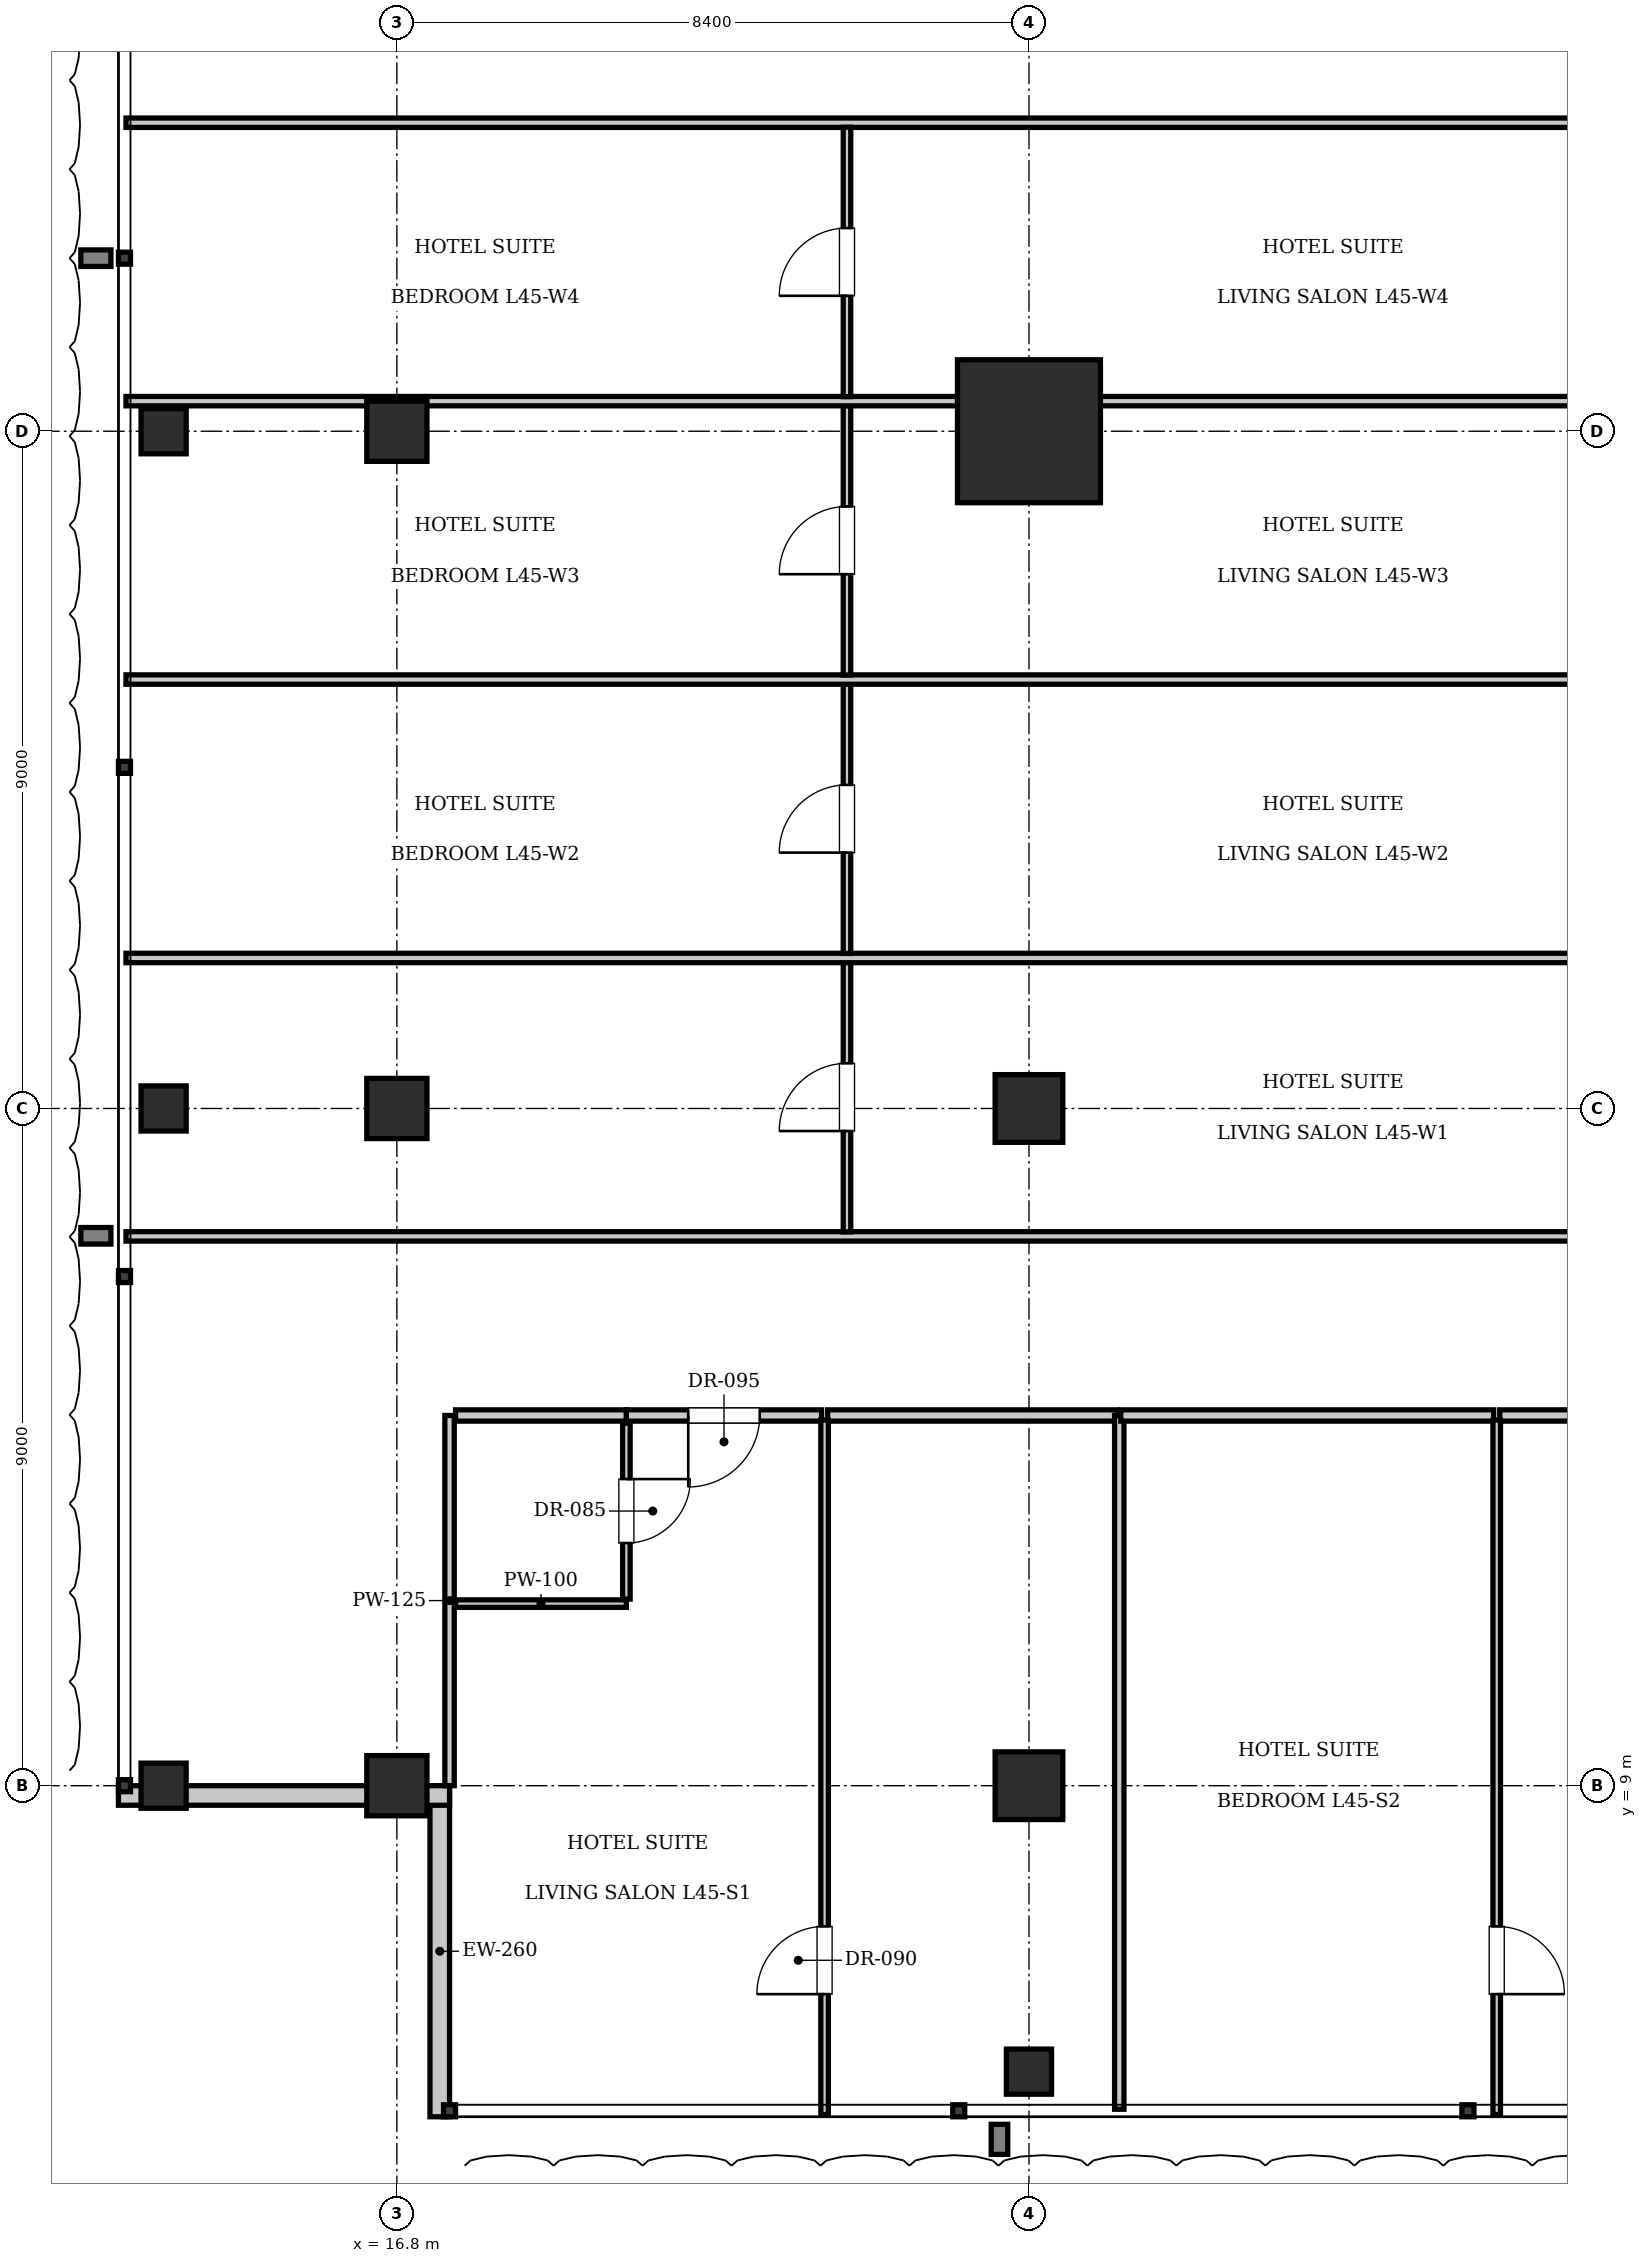
"""IFC4 building model, lengths in metres.
Left out: names, types, materials, properties, quantities, classifications, styles, units other than length and angle.
Written with IfcOpenShell. Run it as: python <this file> out.ifc"""

import sys

from ifc_helpers import new_model, si_unit, direction, frame, frame_2d, origin, origin_2d, place, context, subcontext, project, spatial, rectangle, i_section, extrude, element, fill, save


model = new_model("IFC4")
c1 = context("Model", 3, precision=1e-05, world=origin(), true_north=direction((0.0, 1.0)))
c2 = subcontext(c1, "Body", "Model", "MODEL_VIEW")
j1 = project(units=[si_unit("LENGTHUNIT", "METRE"), si_unit("PLANEANGLEUNIT", "RADIAN")], contexts=[c1])
p1 = place(None, origin())
s1 = spatial("IfcSite", under=j1, at=p1, CompositionType="ELEMENT")
p2 = place(p1, origin())
s2 = spatial("IfcBuilding", under=s1, at=p2, CompositionType="ELEMENT")
p3 = place(p2, frame((0.0, 0.0, 185.15)))
s3 = spatial("IfcBuildingStorey", under=s2, at=p3, CompositionType="ELEMENT", Elevation=185.15)
p4 = place(p3, frame((25.2, 27.0, 0.0), z_axis=(0.0, 0.0, 1.0), x_axis=(1.0, 0.0, 0.0)))
e1 = element("IfcColumn", 1, at=p4, inside=s3, PredefinedType="COLUMN", context=c2, shape_type="SweptSolid", body=[
    extrude(rectangle(XDim=1.9, YDim=1.9, at=origin_2d()), origin(), (0.0, 0.0, 1.0), 3.85),
])
for number, where, z_axis, x_axis in (
    (2, (25.2, 18.0, 0.0), (0.0, 0.0, 1.0), (1.0, 0.0, 0.0)),
    (3, (25.2, 9.0, 0.0), (0.0, 0.0, 1.0), (1.0, 0.0, 0.0)),
):
    element("IfcColumn", number, at=place(p3, frame(where, z_axis=z_axis, x_axis=x_axis)), inside=s3, PredefinedType="COLUMN", context=c2, shape_type="SweptSolid", body=[
        extrude(rectangle(XDim=0.9, YDim=0.9, at=origin_2d()), origin(), (0.0, 0.0, 1.0), 3.85),
    ])
for number, where, z_axis, x_axis in (
    (4, (16.8, 9.0, 0.0), (0.0, 0.0, 1.0), (1.0, 0.0, 0.0)),
    (5, (16.8, 18.0, 0.0), (0.0, 0.0, 1.0), (1.0, 0.0, 0.0)),
    (6, (16.8, 27.0, 0.0), (0.0, 0.0, 1.0), (1.0, 0.0, 0.0)),
):
    element("IfcColumn", number, at=place(p3, frame(where, z_axis=z_axis, x_axis=x_axis)), inside=s3, PredefinedType="COLUMN", context=c2, shape_type="SweptSolid", body=[
        extrude(rectangle(XDim=0.8, YDim=0.8, at=origin_2d()), origin(), (0.0, 0.0, 1.0), 3.85),
    ])
for number, where, z_axis, x_axis in (
    (7, (13.7, 9.0, 0.0), (0.0, 0.0, 1.0), (1.0, 0.0, 0.0)),
    (8, (13.7, 18.0, 0.0), (0.0, 0.0, 1.0), (1.0, 0.0, 0.0)),
    (9, (13.7, 27.0, 0.0), (0.0, 0.0, 1.0), (1.0, 0.0, 0.0)),
    (10, (25.2, 5.2, 0.0), (0.0, 0.0, 1.0), (1.0, 0.0, 0.0)),
):
    element("IfcColumn", number, at=place(p3, frame(where, z_axis=z_axis, x_axis=x_axis)), inside=s3, PredefinedType="COLUMN", context=c2, shape_type="SweptSolid", body=[
        extrude(i_section(OverallWidth=0.6, OverallDepth=0.6, WebThickness=0.025, FlangeThickness=0.038, at=origin_2d()), origin(), (0.0, 0.0, 1.0), 3.85),
    ])
p5 = place(p3, frame((17.37, 4.6, 0.0), z_axis=(0.0, 0.0, 1.0), x_axis=(0.0, 1.0, 0.0)))
e11 = element("IfcWall", 11, at=p5, inside=s3, PredefinedType="SOLIDWALL", context=c2, shape_type="SweptSolid", body=[
    extrude(rectangle(XDim=4.4, YDim=0.26, at=frame_2d((2.2, 0.0))), origin(), (0.0, 0.0, 1.0), 3.61),
])
p6 = place(p3, frame((17.5, 8.87, 0.0), z_axis=(0.0, 0.0, 1.0), x_axis=(-1.0, 0.0, 0.0)))
e12 = element("IfcWall", 12, at=p6, inside=s3, PredefinedType="SOLIDWALL", context=c2, shape_type="SweptSolid", body=[
    extrude(rectangle(XDim=4.4, YDim=0.26, at=frame_2d((2.2, 0.0))), origin(), (0.0, 0.0, 1.0), 3.007),
])
p7 = place(p3, frame((17.5, 9.0, 0.0), z_axis=(0.0, 0.0, 1.0), x_axis=(0.0, 1.0, 0.0)))
e13 = element("IfcWall", 13, at=p7, inside=s3, PredefinedType="PARTITIONING", context=c2, shape_type="SweptSolid", body=[
    extrude(rectangle(XDim=4.92, YDim=0.125, at=frame_2d((2.46, 0.0))), origin(), (0.0, 0.0, 1.0), 3.61),
])
p8 = place(p3, frame((17.58, 13.92, 0.0), z_axis=(0.0, 0.0, 1.0), x_axis=(1.0, 0.0, 0.0)))
e14 = element("IfcWall", 14, at=p8, inside=s3, PredefinedType="PARTITIONING", context=c2, shape_type="SweptSolid", body=[
    extrude(rectangle(XDim=2.27, YDim=0.15, at=frame_2d((1.135, 0.0))), origin(), (0.0, 0.0, 1.0), 3.61),
])
p9 = place(p3, frame((17.58, 11.42, 0.0), z_axis=(0.0, 0.0, 1.0), x_axis=(1.0, 0.0, 0.0)))
e15 = element("IfcWall", 15, at=p9, inside=s3, PredefinedType="PARTITIONING", context=c2, shape_type="SweptSolid", body=[
    extrude(rectangle(XDim=2.27, YDim=0.1, at=frame_2d((1.135, 0.0))), origin(), (0.0, 0.0, 1.0), 3.61),
])
p10 = place(p3, frame((19.85, 11.48, 0.0), z_axis=(0.0, 0.0, 1.0), x_axis=(0.0, 1.0, 0.0)))
e16 = element("IfcWall", 16, at=p10, inside=s3, PredefinedType="PARTITIONING", context=c2, shape_type="SweptSolid", body=[
    extrude(rectangle(XDim=2.34, YDim=0.1, at=frame_2d((1.17, 0.0))), origin(), (0.0, 0.0, 1.0), 3.61),
])
p11 = place(p10, frame((0.745, 0.0, 0.0)))
e17 = element("IfcOpeningElement", 17, at=p11, cuts=e16, PredefinedType="OPENING", context=c2, shape_type="SweptSolid", body=[
    extrude(rectangle(XDim=0.85, YDim=2.1, at=frame_2d((0.425, 1.05))), frame((0.0, 0.06, 0.0), z_axis=(0.0, -1.0, 0.0), x_axis=(1.0, 0.0, 0.0)), (0.0, 0.0, 1.0), 0.12),
])
p12 = place(p3, frame((19.85, 13.92, 0.0), z_axis=(0.0, 0.0, 1.0), x_axis=(1.0, 0.0, 0.0)))
e18 = element("IfcWall", 18, at=p12, inside=s3, PredefinedType="PARTITIONING", context=c2, shape_type="SweptSolid", body=[
    extrude(rectangle(XDim=2.594, YDim=0.15, at=frame_2d((1.297, 0.0))), origin(), (0.0, 0.0, 1.0), 3.61),
])
p13 = place(p12, frame((0.822, 0.0, 0.0)))
e19 = element("IfcOpeningElement", 19, at=p13, cuts=e18, PredefinedType="OPENING", context=c2, shape_type="SweptSolid", body=[
    extrude(rectangle(XDim=0.95, YDim=2.15, at=frame_2d((0.475, 1.075))), frame((0.0, 0.085, 0.0), z_axis=(0.0, -1.0, 0.0), x_axis=(1.0, 0.0, 0.0)), (0.0, 0.0, 1.0), 0.17),
])
p14 = place(p3, frame((22.524, 13.92, 0.0), z_axis=(0.0, 0.0, 1.0), x_axis=(1.0, 0.0, 0.0)))
e20 = element("IfcWall", 20, at=p14, inside=s3, PredefinedType="PARTITIONING", context=c2, shape_type="SweptSolid", body=[
    extrude(rectangle(XDim=3.856, YDim=0.15, at=frame_2d((1.928, 0.0))), origin(), (0.0, 0.0, 1.0), 3.61),
])
p15 = place(p3, frame((22.484, 4.63, 0.0), z_axis=(0.0, 0.0, 1.0), x_axis=(0.0, 1.0, 0.0)))
e21 = element("IfcWall", 21, at=p15, inside=s3, PredefinedType="PARTITIONING", context=c2, shape_type="SweptSolid", body=[
    extrude(rectangle(XDim=9.23, YDim=0.1, at=frame_2d((4.615, 0.0))), origin(), (0.0, 0.0, 1.0), 3.61),
])
p16 = place(p15, frame((1.6, 0.0, 0.0)))
e22 = element("IfcOpeningElement", 22, at=p16, cuts=e21, PredefinedType="OPENING", context=c2, shape_type="SweptSolid", body=[
    extrude(rectangle(XDim=0.9, YDim=2.1, at=frame_2d((0.45, 1.05))), frame((0.0, 0.06, 0.0), z_axis=(0.0, -1.0, 0.0), x_axis=(1.0, 0.0, 0.0)), (0.0, 0.0, 1.0), 0.12),
])
p17 = place(p3, frame((26.4, 4.7, 0.0), z_axis=(0.0, 0.0, 1.0), x_axis=(0.0, 1.0, 0.0)))
e23 = element("IfcWall", 23, at=p17, inside=s3, PredefinedType="PARTITIONING", context=c2, shape_type="SweptSolid", body=[
    extrude(rectangle(XDim=9.22, YDim=0.125, at=frame_2d((4.61, 0.0))), origin(), (0.0, 0.0, 1.0), 3.61),
])
p18 = place(p3, frame((26.42, 13.92, 0.0), z_axis=(0.0, 0.0, 1.0), x_axis=(1.0, 0.0, 0.0)))
e24 = element("IfcWall", 24, at=p18, inside=s3, PredefinedType="PARTITIONING", context=c2, shape_type="SweptSolid", body=[
    extrude(rectangle(XDim=4.956, YDim=0.15, at=frame_2d((2.478, 0.0))), origin(), (0.0, 0.0, 1.0), 3.61),
])
p19 = place(p3, frame((31.456, 13.92, 0.0), z_axis=(0.0, 0.0, 1.0), x_axis=(1.0, 0.0, 0.0)))
e25 = element("IfcWall", 25, at=p19, inside=s3, PredefinedType="PARTITIONING", context=c2, shape_type="SweptSolid", body=[
    extrude(rectangle(XDim=3.994, YDim=0.15, at=frame_2d((1.997, 0.0))), origin(), (0.0, 0.0, 1.0), 3.61),
])
p20 = place(p19, frame((1.522, 0.0, 0.0)))
e26 = element("IfcOpeningElement", 26, at=p20, cuts=e25, PredefinedType="OPENING", context=c2, shape_type="SweptSolid", body=[
    extrude(rectangle(XDim=0.95, YDim=2.15, at=frame_2d((0.475, 1.075))), frame((0.0, 0.085, 0.0), z_axis=(0.0, -1.0, 0.0), x_axis=(1.0, 0.0, 0.0)), (0.0, 0.0, 1.0), 0.17),
])
p21 = place(p3, frame((31.416, 4.63, 0.0), z_axis=(0.0, 0.0, 1.0), x_axis=(0.0, 1.0, 0.0)))
e27 = element("IfcWall", 27, at=p21, inside=s3, PredefinedType="PARTITIONING", context=c2, shape_type="SweptSolid", body=[
    extrude(rectangle(XDim=9.23, YDim=0.1, at=frame_2d((4.615, 0.0))), origin(), (0.0, 0.0, 1.0), 3.61),
])
p22 = place(p21, frame((1.6, 0.0, 0.0)))
e28 = element("IfcOpeningElement", 28, at=p22, cuts=e27, PredefinedType="OPENING", context=c2, shape_type="SweptSolid", body=[
    extrude(rectangle(XDim=0.9, YDim=2.1, at=frame_2d((0.45, 1.05))), frame((0.0, 0.06, 0.0), z_axis=(0.0, -1.0, 0.0), x_axis=(1.0, 0.0, 0.0)), (0.0, 0.0, 1.0), 0.12),
])
for number, where, z_axis, x_axis in (
    (29, (13.2, 16.3, 0.0), (0.0, 0.0, 1.0), (1.0, 0.0, 0.0)),
    (30, (13.2, 31.1, 0.0), (0.0, 0.0, 1.0), (1.0, 0.0, 0.0)),
):
    element("IfcWall", number, at=place(p3, frame(where, z_axis=z_axis, x_axis=x_axis)), inside=s3, PredefinedType="PARTITIONING", context=c2, shape_type="SweptSolid", body=[
        extrude(rectangle(XDim=22.52, YDim=0.125, at=frame_2d((11.26, 0.0))), origin(), (0.0, 0.0, 1.0), 3.61),
    ])
p23 = place(p3, frame((22.781, 16.36, 0.0), z_axis=(0.0, 0.0, 1.0), x_axis=(0.0, 1.0, 0.0)))
e31 = element("IfcWall", 31, at=p23, inside=s3, PredefinedType="PARTITIONING", context=c2, shape_type="SweptSolid", body=[
    extrude(rectangle(XDim=3.58, YDim=0.1, at=frame_2d((1.79, 0.0))), origin(), (0.0, 0.0, 1.0), 3.61),
])
p24 = place(p23, frame((1.34, 0.0, 0.0)))
e32 = element("IfcOpeningElement", 32, at=p24, cuts=e31, PredefinedType="OPENING", context=c2, shape_type="SweptSolid", body=[
    extrude(rectangle(XDim=0.9, YDim=2.1, at=frame_2d((0.45, 1.05))), frame((0.0, 0.06, 0.0), z_axis=(0.0, -1.0, 0.0), x_axis=(1.0, 0.0, 0.0)), (0.0, 0.0, 1.0), 0.12),
])
p25 = place(p3, frame((13.2, 20.0, 0.0), z_axis=(0.0, 0.0, 1.0), x_axis=(1.0, 0.0, 0.0)))
e33 = element("IfcWall", 33, at=p25, inside=s3, PredefinedType="PARTITIONING", context=c2, shape_type="SweptSolid", body=[
    extrude(rectangle(XDim=22.52, YDim=0.125, at=frame_2d((11.26, 0.0))), origin(), (0.0, 0.0, 1.0), 3.61),
])
p26 = place(p3, frame((22.781, 20.06, 0.0), z_axis=(0.0, 0.0, 1.0), x_axis=(0.0, 1.0, 0.0)))
e34 = element("IfcWall", 34, at=p26, inside=s3, PredefinedType="PARTITIONING", context=c2, shape_type="SweptSolid", body=[
    extrude(rectangle(XDim=3.58, YDim=0.1, at=frame_2d((1.79, 0.0))), origin(), (0.0, 0.0, 1.0), 3.61),
])
p27 = place(p26, frame((1.34, 0.0, 0.0)))
e35 = element("IfcOpeningElement", 35, at=p27, cuts=e34, PredefinedType="OPENING", context=c2, shape_type="SweptSolid", body=[
    extrude(rectangle(XDim=0.9, YDim=2.1, at=frame_2d((0.45, 1.05))), frame((0.0, 0.06, 0.0), z_axis=(0.0, -1.0, 0.0), x_axis=(1.0, 0.0, 0.0)), (0.0, 0.0, 1.0), 0.12),
])
p28 = place(p3, frame((13.2, 23.7, 0.0), z_axis=(0.0, 0.0, 1.0), x_axis=(1.0, 0.0, 0.0)))
e36 = element("IfcWall", 36, at=p28, inside=s3, PredefinedType="PARTITIONING", context=c2, shape_type="SweptSolid", body=[
    extrude(rectangle(XDim=22.52, YDim=0.125, at=frame_2d((11.26, 0.0))), origin(), (0.0, 0.0, 1.0), 3.61),
])
p29 = place(p3, frame((22.781, 23.76, 0.0), z_axis=(0.0, 0.0, 1.0), x_axis=(0.0, 1.0, 0.0)))
e37 = element("IfcWall", 37, at=p29, inside=s3, PredefinedType="PARTITIONING", context=c2, shape_type="SweptSolid", body=[
    extrude(rectangle(XDim=3.58, YDim=0.1, at=frame_2d((1.79, 0.0))), origin(), (0.0, 0.0, 1.0), 3.61),
])
p30 = place(p29, frame((1.34, 0.0, 0.0)))
e38 = element("IfcOpeningElement", 38, at=p30, cuts=e37, PredefinedType="OPENING", context=c2, shape_type="SweptSolid", body=[
    extrude(rectangle(XDim=0.9, YDim=2.1, at=frame_2d((0.45, 1.05))), frame((0.0, 0.06, 0.0), z_axis=(0.0, -1.0, 0.0), x_axis=(1.0, 0.0, 0.0)), (0.0, 0.0, 1.0), 0.12),
])
p31 = place(p3, frame((13.2, 27.4, 0.0), z_axis=(0.0, 0.0, 1.0), x_axis=(1.0, 0.0, 0.0)))
e39 = element("IfcWall", 39, at=p31, inside=s3, PredefinedType="PARTITIONING", context=c2, shape_type="SweptSolid", body=[
    extrude(rectangle(XDim=22.52, YDim=0.125, at=frame_2d((11.26, 0.0))), origin(), (0.0, 0.0, 1.0), 3.61),
])
p32 = place(p3, frame((22.781, 27.46, 0.0), z_axis=(0.0, 0.0, 1.0), x_axis=(0.0, 1.0, 0.0)))
e40 = element("IfcWall", 40, at=p32, inside=s3, PredefinedType="PARTITIONING", context=c2, shape_type="SweptSolid", body=[
    extrude(rectangle(XDim=3.58, YDim=0.1, at=frame_2d((1.79, 0.0))), origin(), (0.0, 0.0, 1.0), 3.61),
])
p33 = place(p32, frame((1.34, 0.0, 0.0)))
e41 = element("IfcOpeningElement", 41, at=p33, cuts=e40, PredefinedType="OPENING", context=c2, shape_type="SweptSolid", body=[
    extrude(rectangle(XDim=0.9, YDim=2.1, at=frame_2d((0.45, 1.05))), frame((0.0, 0.06, 0.0), z_axis=(0.0, -1.0, 0.0), x_axis=(1.0, 0.0, 0.0)), (0.0, 0.0, 1.0), 0.12),
])
p34 = place(p11, frame((0.85, 0.0, 0.0), z_axis=(0.0, 0.0, 1.0), x_axis=(-1.0, 0.0, 0.0)))
e42 = element("IfcDoor", 42, at=p34, inside=s3, OperationType="SINGLE_SWING_LEFT", PredefinedType="DOOR", context=c2, shape_type="SweptSolid", body=[
    extrude(rectangle(XDim=0.85, YDim=2.1, at=frame_2d((0.425, 1.05))), frame((0.0, 0.025, 0.0), z_axis=(0.0, -1.0, 0.0), x_axis=(1.0, 0.0, 0.0)), (0.0, 0.0, 1.0), 0.05),
])
fill(e17, e42)
p35 = place(p13, frame((0.95, 0.0, 0.0), z_axis=(0.0, 0.0, 1.0), x_axis=(-1.0, 0.0, 0.0)))
e43 = element("IfcDoor", 43, at=p35, inside=s3, OperationType="SINGLE_SWING_RIGHT", PredefinedType="DOOR", context=c2, shape_type="SweptSolid", body=[
    extrude(rectangle(XDim=0.95, YDim=2.15, at=frame_2d((0.475, 1.075))), frame((0.0, 0.025, 0.0), z_axis=(0.0, -1.0, 0.0), x_axis=(1.0, 0.0, 0.0)), (0.0, 0.0, 1.0), 0.05),
])
fill(e19, e43)
p36 = place(p16, origin())
e44 = element("IfcDoor", 44, at=p36, inside=s3, OperationType="SINGLE_SWING_LEFT", PredefinedType="DOOR", context=c2, shape_type="SweptSolid", body=[
    extrude(rectangle(XDim=0.9, YDim=2.1, at=frame_2d((0.45, 1.05))), frame((0.0, 0.025, 0.0), z_axis=(0.0, -1.0, 0.0), x_axis=(1.0, 0.0, 0.0)), (0.0, 0.0, 1.0), 0.05),
])
fill(e22, e44)
p37 = place(p22, frame((0.9, 0.0, 0.0), z_axis=(0.0, 0.0, 1.0), x_axis=(-1.0, 0.0, 0.0)))
e45 = element("IfcDoor", 45, at=p37, inside=s3, OperationType="SINGLE_SWING_RIGHT", PredefinedType="DOOR", context=c2, shape_type="SweptSolid", body=[
    extrude(rectangle(XDim=0.9, YDim=2.1, at=frame_2d((0.45, 1.05))), frame((0.0, 0.025, 0.0), z_axis=(0.0, -1.0, 0.0), x_axis=(1.0, 0.0, 0.0)), (0.0, 0.0, 1.0), 0.05),
])
fill(e28, e45)
p38 = place(p24, origin())
e46 = element("IfcDoor", 46, at=p38, inside=s3, OperationType="SINGLE_SWING_LEFT", PredefinedType="DOOR", context=c2, shape_type="SweptSolid", body=[
    extrude(rectangle(XDim=0.9, YDim=2.1, at=frame_2d((0.45, 1.05))), frame((0.0, 0.025, 0.0), z_axis=(0.0, -1.0, 0.0), x_axis=(1.0, 0.0, 0.0)), (0.0, 0.0, 1.0), 0.05),
])
fill(e32, e46)
p39 = place(p27, origin())
e47 = element("IfcDoor", 47, at=p39, inside=s3, OperationType="SINGLE_SWING_LEFT", PredefinedType="DOOR", context=c2, shape_type="SweptSolid", body=[
    extrude(rectangle(XDim=0.9, YDim=2.1, at=frame_2d((0.45, 1.05))), frame((0.0, 0.025, 0.0), z_axis=(0.0, -1.0, 0.0), x_axis=(1.0, 0.0, 0.0)), (0.0, 0.0, 1.0), 0.05),
])
fill(e35, e47)
p40 = place(p30, origin())
e48 = element("IfcDoor", 48, at=p40, inside=s3, OperationType="SINGLE_SWING_LEFT", PredefinedType="DOOR", context=c2, shape_type="SweptSolid", body=[
    extrude(rectangle(XDim=0.9, YDim=2.1, at=frame_2d((0.45, 1.05))), frame((0.0, 0.025, 0.0), z_axis=(0.0, -1.0, 0.0), x_axis=(1.0, 0.0, 0.0)), (0.0, 0.0, 1.0), 0.05),
])
fill(e38, e48)
p41 = place(p33, origin())
e49 = element("IfcDoor", 49, at=p41, inside=s3, OperationType="SINGLE_SWING_LEFT", PredefinedType="DOOR", context=c2, shape_type="SweptSolid", body=[
    extrude(rectangle(XDim=0.9, YDim=2.1, at=frame_2d((0.45, 1.05))), frame((0.0, 0.025, 0.0), z_axis=(0.0, -1.0, 0.0), x_axis=(1.0, 0.0, 0.0)), (0.0, 0.0, 1.0), 0.05),
])
fill(e41, e49)
save(model, sys.argv[1])
